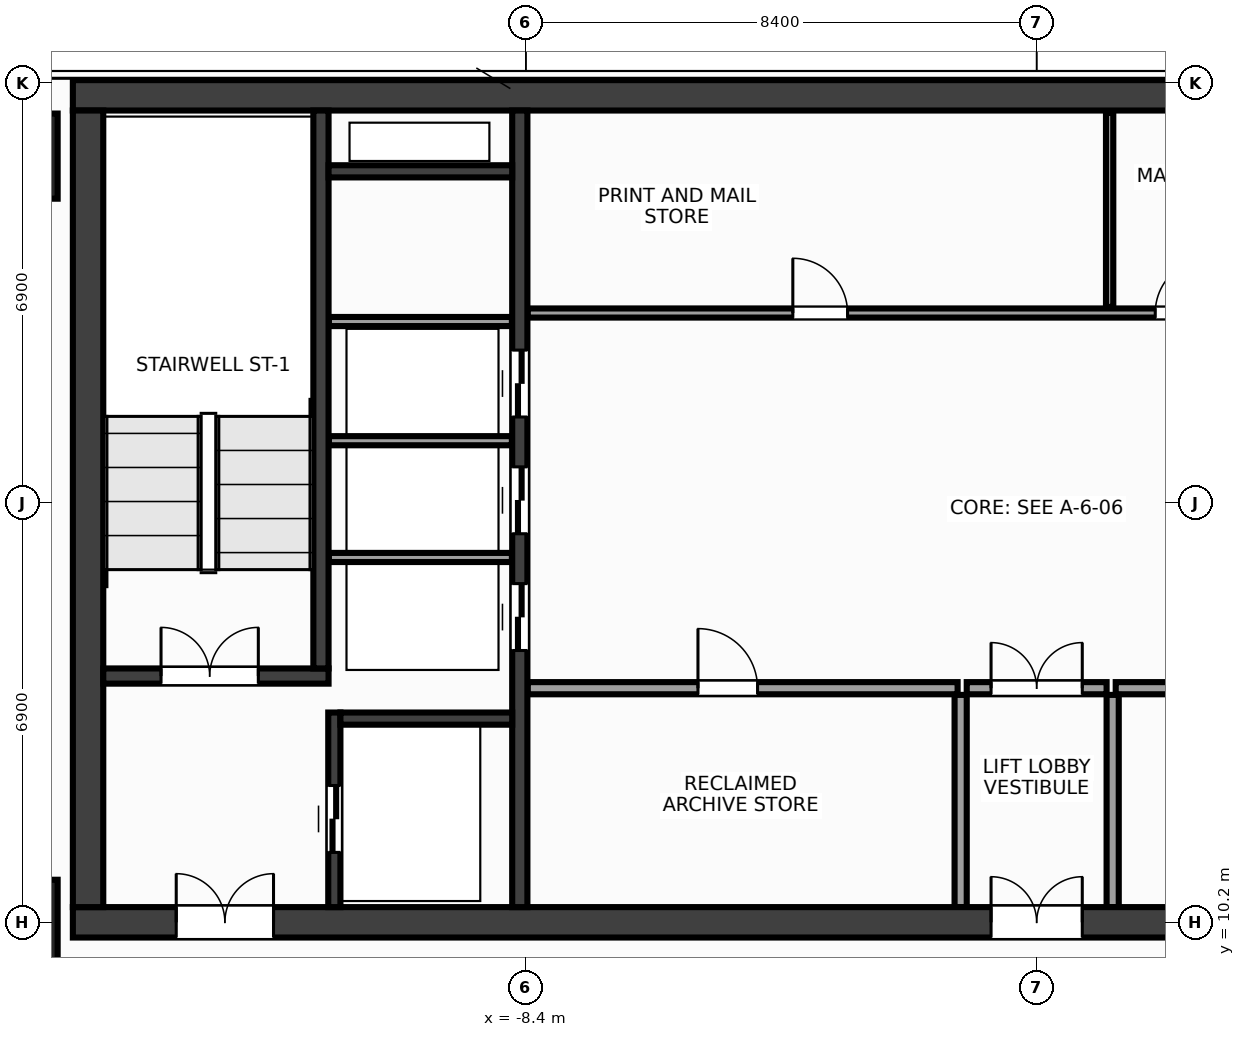
"""IFC4 building model, lengths in metres.
Left out: names, types, materials, properties, quantities, classifications, styles, units other than length and angle.
Written with IfcOpenShell. Run it as: python <this file> out.ifc"""

import sys

from ifc_helpers import new_model, si_unit, direction, frame, frame_2d, origin, origin_2d, place, context, subcontext, project, spatial, rectangle, extrude, source, transform, mapped, element, fill, save


model = new_model("IFC4")
c1 = context("Model", 3, precision=1e-05, world=origin(), true_north=direction((0.0, 1.0)))
c2 = subcontext(c1, "Body", "Model", "MODEL_VIEW")
j1 = project(units=[si_unit("LENGTHUNIT", "METRE"), si_unit("PLANEANGLEUNIT", "RADIAN")], contexts=[c1])
p1 = place(None, origin())
s1 = spatial("IfcSite", under=j1, at=p1, CompositionType="ELEMENT")
p2 = place(p1, origin())
s2 = spatial("IfcBuilding", under=s1, at=p2, CompositionType="ELEMENT")
p3 = place(p2, frame((0.0, 0.0, 250.4)))
s3 = spatial("IfcBuildingStorey", under=s2, at=p3, CompositionType="ELEMENT", Elevation=250.4)
m1 = source(origin(), c2, "Body", "SweptSolid", [
    extrude(rectangle(XDim=31.7, YDim=0.5, at=frame_2d((15.85, 0.0))), origin(), (0.0, 0.0, 1.0), 3.6),
])
p4 = place(p3, frame((-15.85, 23.8, 0.0), z_axis=(0.0, 0.0, 1.0), x_axis=(1.0, 0.0, 0.0)))
e1 = element("IfcWall", 1, at=p4, inside=s3, PredefinedType="SHEAR", context=c2, shape_type="MappedRepresentation", body=[
    mapped(m1, transform((0.0, 0.0, 0.0), x_axis=(1.0, 0.0, 0.0), y_axis=(0.0, 1.0, 0.0), z_axis=(0.0, 0.0, 1.0), scale=1.0)),
])
p5 = place(p3, frame((-15.85, 10.2, 0.0), z_axis=(0.0, 0.0, 1.0), x_axis=(1.0, 0.0, 0.0)))
e2 = element("IfcWall", 2, at=p5, inside=s3, PredefinedType="SHEAR", context=c2, shape_type="MappedRepresentation", body=[
    mapped(m1, transform((0.0, 0.0, 0.0), x_axis=(1.0, 0.0, 0.0), y_axis=(0.0, 1.0, 0.0), z_axis=(0.0, 0.0, 1.0), scale=1.0)),
])
p6 = place(p5, frame((1.7, 0.0, 0.0)))
e3 = element("IfcOpeningElement", 3, at=p6, cuts=e2, PredefinedType="OPENING", context=c2, shape_type="SweptSolid", body=[
    extrude(rectangle(XDim=1.6, YDim=2.15, at=frame_2d((0.8, 1.075))), frame((0.0, 0.262, 0.0), z_axis=(0.0, -1.0, 0.0), x_axis=(1.0, 0.0, 0.0)), (0.0, 0.0, 1.0), 0.524),
])
p7 = place(p5, frame((28.4, 0.0, 0.0)))
e4 = element("IfcOpeningElement", 4, at=p7, cuts=e2, PredefinedType="OPENING", context=c2, shape_type="SweptSolid", body=[
    extrude(rectangle(XDim=1.6, YDim=2.15, at=frame_2d((0.8, 1.075))), frame((0.0, 0.262, 0.0), z_axis=(0.0, -1.0, 0.0), x_axis=(1.0, 0.0, 0.0)), (0.0, 0.0, 1.0), 0.524),
])
p8 = place(p5, frame((15.1, 0.0, 0.0)))
e5 = element("IfcOpeningElement", 5, at=p8, cuts=e2, PredefinedType="OPENING", context=c2, shape_type="SweptSolid", body=[
    extrude(rectangle(XDim=1.5, YDim=2.2, at=frame_2d((0.75, 1.1))), frame((0.0, 0.262, 0.0), z_axis=(0.0, -1.0, 0.0), x_axis=(1.0, 0.0, 0.0)), (0.0, 0.0, 1.0), 0.524),
])
m2 = source(origin(), c2, "Body", "SweptSolid", [
    extrude(rectangle(XDim=13.1, YDim=0.5, at=frame_2d((6.55, 0.0))), origin(), (0.0, 0.0, 1.0), 3.6),
])
p9 = place(p3, frame((-15.6, 10.45, 0.0), z_axis=(0.0, 0.0, 1.0), x_axis=(0.0, 1.0, 0.0)))
e6 = element("IfcWall", 6, at=p9, inside=s3, PredefinedType="SHEAR", context=c2, shape_type="MappedRepresentation", body=[
    mapped(m2, transform((0.0, 0.0, 0.0), x_axis=(1.0, 0.0, 0.0), y_axis=(0.0, 1.0, 0.0), z_axis=(0.0, 0.0, 1.0), scale=1.0)),
])
m3 = source(origin(), c2, "Body", "SweptSolid", [
    extrude(rectangle(XDim=13.1, YDim=0.25, at=frame_2d((6.55, 0.0))), origin(), (0.0, 0.0, 1.0), 3.6),
])
p10 = place(p3, frame((-8.5, 10.45, 0.0), z_axis=(0.0, 0.0, 1.0), x_axis=(0.0, 1.0, 0.0)))
e7 = element("IfcWall", 7, at=p10, inside=s3, PredefinedType="SHEAR", context=c2, shape_type="MappedRepresentation", body=[
    mapped(m3, transform((0.0, 0.0, 0.0), x_axis=(1.0, 0.0, 0.0), y_axis=(0.0, 1.0, 0.0), z_axis=(0.0, 0.0, 1.0), scale=1.0)),
])
p11 = place(p10, frame((4.22, 0.0, 0.0)))
e8 = element("IfcOpeningElement", 8, at=p11, cuts=e7, PredefinedType="OPENING", context=c2, shape_type="SweptSolid", body=[
    extrude(rectangle(XDim=1.1, YDim=2.15, at=frame_2d((0.55, 1.075))), frame((0.0, 0.137, 0.0), z_axis=(0.0, -1.0, 0.0), x_axis=(1.0, 0.0, 0.0)), (0.0, 0.0, 1.0), 0.274),
])
p12 = place(p10, frame((6.14, 0.0, 0.0)))
e9 = element("IfcOpeningElement", 9, at=p12, cuts=e7, PredefinedType="OPENING", context=c2, shape_type="SweptSolid", body=[
    extrude(rectangle(XDim=1.1, YDim=2.15, at=frame_2d((0.55, 1.075))), frame((0.0, 0.137, 0.0), z_axis=(0.0, -1.0, 0.0), x_axis=(1.0, 0.0, 0.0)), (0.0, 0.0, 1.0), 0.274),
])
p13 = place(p10, frame((8.06, 0.0, 0.0)))
e10 = element("IfcOpeningElement", 10, at=p13, cuts=e7, PredefinedType="OPENING", context=c2, shape_type="SweptSolid", body=[
    extrude(rectangle(XDim=1.1, YDim=2.15, at=frame_2d((0.55, 1.075))), frame((0.0, 0.137, 0.0), z_axis=(0.0, -1.0, 0.0), x_axis=(1.0, 0.0, 0.0)), (0.0, 0.0, 1.0), 0.274),
])
m4 = source(origin(), c2, "Body", "SweptSolid", [
    extrude(rectangle(XDim=3.705, YDim=0.25, at=frame_2d((1.853, 0.0))), origin(), (0.0, 0.0, 1.0), 3.6),
])
p14 = place(p3, frame((-15.35, 14.25, 0.0), z_axis=(0.0, 0.0, 1.0), x_axis=(1.0, 0.0, 0.0)))
e11 = element("IfcWall", 11, at=p14, inside=s3, PredefinedType="SHEAR", context=c2, shape_type="MappedRepresentation", body=[
    mapped(m4, transform((0.0, 0.0, 0.0), x_axis=(1.0, 0.0, 0.0), y_axis=(0.0, 1.0, 0.0), z_axis=(0.0, 0.0, 1.0), scale=1.0)),
])
p15 = place(p14, frame((0.95, 0.0, 0.0)))
e12 = element("IfcOpeningElement", 12, at=p15, cuts=e11, PredefinedType="OPENING", context=c2, shape_type="SweptSolid", body=[
    extrude(rectangle(XDim=1.6, YDim=2.15, at=frame_2d((0.8, 1.075))), frame((0.0, 0.137, 0.0), z_axis=(0.0, -1.0, 0.0), x_axis=(1.0, 0.0, 0.0)), (0.0, 0.0, 1.0), 0.274),
])
m5 = source(origin(), c2, "Body", "SweptSolid", [
    extrude(rectangle(XDim=9.175, YDim=0.25, at=frame_2d((4.587, 0.0))), origin(), (0.0, 0.0, 1.0), 3.6),
])
p16 = place(p3, frame((-11.77, 14.375, 0.0), z_axis=(0.0, 0.0, 1.0), x_axis=(0.0, 1.0, 0.0)))
e13 = element("IfcWall", 13, at=p16, inside=s3, PredefinedType="SHEAR", context=c2, shape_type="MappedRepresentation", body=[
    mapped(m5, transform((0.0, 0.0, 0.0), x_axis=(1.0, 0.0, 0.0), y_axis=(0.0, 1.0, 0.0), z_axis=(0.0, 0.0, 1.0), scale=1.0)),
])
m6 = source(origin(), c2, "Body", "SweptSolid", [
    extrude(rectangle(XDim=3.2, YDim=0.2, at=frame_2d((1.6, 0.0))), origin(), (0.0, 0.0, 1.0), 3.6),
])
p17 = place(p3, frame((-11.55, 10.45, 0.0), z_axis=(0.0, 0.0, 1.0), x_axis=(0.0, 1.0, 0.0)))
e14 = element("IfcWall", 14, at=p17, inside=s3, PredefinedType="SHEAR", context=c2, shape_type="MappedRepresentation", body=[
    mapped(m6, transform((0.0, 0.0, 0.0), x_axis=(1.0, 0.0, 0.0), y_axis=(0.0, 1.0, 0.0), z_axis=(0.0, 0.0, 1.0), scale=1.0)),
])
p18 = place(p17, frame((0.9, 0.0, 0.0)))
e15 = element("IfcOpeningElement", 15, at=p18, cuts=e14, PredefinedType="OPENING", context=c2, shape_type="SweptSolid", body=[
    extrude(rectangle(XDim=1.1, YDim=2.15, at=frame_2d((0.55, 1.075))), frame((0.0, 0.112, 0.0), z_axis=(0.0, -1.0, 0.0), x_axis=(1.0, 0.0, 0.0)), (0.0, 0.0, 1.0), 0.224),
])
m7 = source(origin(), c2, "Body", "SweptSolid", [
    extrude(rectangle(XDim=2.825, YDim=0.2, at=frame_2d((1.413, 0.0))), origin(), (0.0, 0.0, 1.0), 3.6),
])
p19 = place(p3, frame((-11.45, 13.55, 0.0), z_axis=(0.0, 0.0, 1.0), x_axis=(1.0, 0.0, 0.0)))
e16 = element("IfcWall", 16, at=p19, inside=s3, PredefinedType="SHEAR", context=c2, shape_type="MappedRepresentation", body=[
    mapped(m7, transform((0.0, 0.0, 0.0), x_axis=(1.0, 0.0, 0.0), y_axis=(0.0, 1.0, 0.0), z_axis=(0.0, 0.0, 1.0), scale=1.0)),
])
m8 = source(origin(), c2, "Body", "SweptSolid", [
    extrude(rectangle(XDim=3.02, YDim=0.2, at=frame_2d((1.51, 0.0))), origin(), (0.0, 0.0, 1.0), 3.6),
])
p20 = place(p3, frame((-11.645, 22.55, 0.0), z_axis=(0.0, 0.0, 1.0), x_axis=(1.0, 0.0, 0.0)))
e17 = element("IfcWall", 17, at=p20, inside=s3, PredefinedType="SHEAR", context=c2, shape_type="MappedRepresentation", body=[
    mapped(m8, transform((0.0, 0.0, 0.0), x_axis=(1.0, 0.0, 0.0), y_axis=(0.0, 1.0, 0.0), z_axis=(0.0, 0.0, 1.0), scale=1.0)),
])
m9 = source(origin(), c2, "Body", "SweptSolid", [
    extrude(rectangle(XDim=1.4, YDim=1.4, at=origin_2d()), origin(), (0.0, 0.0, 1.0), 3.6),
])
for number, where, z_axis, x_axis in (
    (18, (-16.8, 10.2, 0.0), (0.0, 0.0, 1.0), (1.0, 0.0, 0.0)),
    (19, (-16.8, 22.8, 0.0), (0.0, 0.0, 1.0), (1.0, 0.0, 0.0)),
):
    element("IfcColumn", number, at=place(p3, frame(where, z_axis=z_axis, x_axis=x_axis)), inside=s3, PredefinedType="COLUMN", context=c2, shape_type="MappedRepresentation", body=[
        mapped(m9, transform((0.0, 0.0, 0.0), x_axis=(1.0, 0.0, 0.0), y_axis=(0.0, 1.0, 0.0), z_axis=(0.0, 0.0, 1.0), scale=1.0)),
    ])
m10 = source(origin(), c2, "Body", "SweptSolid", [
    extrude(rectangle(XDim=3.01, YDim=0.15, at=frame_2d((1.505, 0.0))), origin(), (0.0, 0.0, 1.0), 3.37),
])
for number, where, z_axis, x_axis in (
    (20, (-11.64, 16.2, 0.0), (0.0, 0.0, 1.0), (1.0, 0.0, 0.0)),
    (21, (-11.64, 18.12, 0.0), (0.0, 0.0, 1.0), (1.0, 0.0, 0.0)),
    (22, (-11.64, 20.08, 0.0), (0.0, 0.0, 1.0), (1.0, 0.0, 0.0)),
):
    element("IfcWall", number, at=place(p3, frame(where, z_axis=z_axis, x_axis=x_axis)), inside=s3, PredefinedType="PARTITIONING", context=c2, shape_type="MappedRepresentation", body=[
        mapped(m10, transform((0.0, 0.0, 0.0), x_axis=(1.0, 0.0, 0.0), y_axis=(0.0, 1.0, 0.0), z_axis=(0.0, 0.0, 1.0), scale=1.0)),
    ])
m11 = source(origin(), c2, "Body", "SweptSolid", [
    extrude(rectangle(XDim=7.07, YDim=0.2, at=frame_2d((3.535, 0.0))), origin(), (0.0, 0.0, 1.0), 3.37),
])
p21 = place(p3, frame((-8.37, 14.05, 0.0), z_axis=(0.0, 0.0, 1.0), x_axis=(1.0, 0.0, 0.0)))
e23 = element("IfcWall", 23, at=p21, inside=s3, PredefinedType="PARTITIONING", context=c2, shape_type="MappedRepresentation", body=[
    mapped(m11, transform((0.0, 0.0, 0.0), x_axis=(1.0, 0.0, 0.0), y_axis=(0.0, 1.0, 0.0), z_axis=(0.0, 0.0, 1.0), scale=1.0)),
])
p22 = place(p21, frame((2.8, 0.0, 0.0)))
e24 = element("IfcOpeningElement", 24, at=p22, cuts=e23, PredefinedType="OPENING", context=c2, shape_type="SweptSolid", body=[
    extrude(rectangle(XDim=0.98, YDim=2.15, at=frame_2d((0.49, 1.075))), frame((0.0, 0.112, 0.0), z_axis=(0.0, -1.0, 0.0), x_axis=(1.0, 0.0, 0.0)), (0.0, 0.0, 1.0), 0.224),
])
p23 = place(p3, frame((1.3, 14.05, 0.0), z_axis=(0.0, 0.0, 1.0), x_axis=(1.0, 0.0, 0.0)))
e25 = element("IfcWall", 25, at=p23, inside=s3, PredefinedType="PARTITIONING", context=c2, shape_type="MappedRepresentation", body=[
    mapped(m11, transform((0.0, 0.0, 0.0), x_axis=(1.0, 0.0, 0.0), y_axis=(0.0, 1.0, 0.0), z_axis=(0.0, 0.0, 1.0), scale=1.0)),
])
p24 = place(p23, frame((1.16, 0.0, 0.0)))
e26 = element("IfcOpeningElement", 26, at=p24, cuts=e25, PredefinedType="OPENING", context=c2, shape_type="SweptSolid", body=[
    extrude(rectangle(XDim=0.9, YDim=2.15, at=frame_2d((0.45, 1.075))), frame((0.0, 0.112, 0.0), z_axis=(0.0, -1.0, 0.0), x_axis=(1.0, 0.0, 0.0)), (0.0, 0.0, 1.0), 0.224),
])
p25 = place(p23, frame((4.61, 0.0, 0.0)))
e27 = element("IfcOpeningElement", 27, at=p25, cuts=e25, PredefinedType="OPENING", context=c2, shape_type="SweptSolid", body=[
    extrude(rectangle(XDim=0.9, YDim=2.15, at=frame_2d((0.45, 1.075))), frame((0.0, 0.112, 0.0), z_axis=(0.0, -1.0, 0.0), x_axis=(1.0, 0.0, 0.0)), (0.0, 0.0, 1.0), 0.224),
])
m12 = source(origin(), c2, "Body", "SweptSolid", [
    extrude(rectangle(XDim=3.49, YDim=0.2, at=frame_2d((1.745, 0.0))), origin(), (0.0, 0.0, 1.0), 3.37),
])
for number, where, z_axis, x_axis in (
    (28, (-1.25, 10.45, 0.0), (0.0, 0.0, 1.0), (0.0, 1.0, 0.0)),
    (29, (1.25, 10.45, 0.0), (0.0, 0.0, 1.0), (0.0, 1.0, 0.0)),
):
    element("IfcWall", number, at=place(p3, frame(where, z_axis=z_axis, x_axis=x_axis)), inside=s3, PredefinedType="PARTITIONING", context=c2, shape_type="MappedRepresentation", body=[
        mapped(m12, transform((0.0, 0.0, 0.0), x_axis=(1.0, 0.0, 0.0), y_axis=(0.0, 1.0, 0.0), z_axis=(0.0, 0.0, 1.0), scale=1.0)),
    ])
m13 = source(origin(), c2, "Body", "SweptSolid", [
    extrude(rectangle(XDim=2.3, YDim=0.2, at=frame_2d((1.15, 0.0))), origin(), (0.0, 0.0, 1.0), 3.37),
])
p26 = place(p3, frame((-1.15, 14.05, 0.0), z_axis=(0.0, 0.0, 1.0), x_axis=(1.0, 0.0, 0.0)))
e30 = element("IfcWall", 30, at=p26, inside=s3, PredefinedType="PARTITIONING", context=c2, shape_type="MappedRepresentation", body=[
    mapped(m13, transform((0.0, 0.0, 0.0), x_axis=(1.0, 0.0, 0.0), y_axis=(0.0, 1.0, 0.0), z_axis=(0.0, 0.0, 1.0), scale=1.0)),
])
p27 = place(p26, frame((0.4, 0.0, 0.0)))
e31 = element("IfcOpeningElement", 31, at=p27, cuts=e30, PredefinedType="OPENING", context=c2, shape_type="SweptSolid", body=[
    extrude(rectangle(XDim=1.5, YDim=2.2, at=frame_2d((0.75, 1.1))), frame((0.0, 0.112, 0.0), z_axis=(0.0, -1.0, 0.0), x_axis=(1.0, 0.0, 0.0)), (0.0, 0.0, 1.0), 0.224),
])
m14 = source(origin(), c2, "Body", "SweptSolid", [
    extrude(rectangle(XDim=14.59, YDim=0.15, at=frame_2d((7.295, 0.0))), origin(), (0.0, 0.0, 1.0), 3.37),
])
p28 = place(p3, frame((-8.37, 20.22, 0.0), z_axis=(0.0, 0.0, 1.0), x_axis=(1.0, 0.0, 0.0)))
e32 = element("IfcWall", 32, at=p28, inside=s3, PredefinedType="PARTITIONING", context=c2, shape_type="MappedRepresentation", body=[
    mapped(m14, transform((0.0, 0.0, 0.0), x_axis=(1.0, 0.0, 0.0), y_axis=(0.0, 1.0, 0.0), z_axis=(0.0, 0.0, 1.0), scale=1.0)),
])
p29 = place(p28, frame((4.36, 0.0, 0.0)))
e33 = element("IfcOpeningElement", 33, at=p29, cuts=e32, PredefinedType="OPENING", context=c2, shape_type="SweptSolid", body=[
    extrude(rectangle(XDim=0.9, YDim=2.15, at=frame_2d((0.45, 1.075))), frame((0.0, 0.087, 0.0), z_axis=(0.0, -1.0, 0.0), x_axis=(1.0, 0.0, 0.0)), (0.0, 0.0, 1.0), 0.174),
])
p30 = place(p28, frame((10.32, 0.0, 0.0)))
e34 = element("IfcOpeningElement", 34, at=p30, cuts=e32, PredefinedType="OPENING", context=c2, shape_type="SweptSolid", body=[
    extrude(rectangle(XDim=0.9, YDim=2.15, at=frame_2d((0.45, 1.075))), frame((0.0, 0.087, 0.0), z_axis=(0.0, -1.0, 0.0), x_axis=(1.0, 0.0, 0.0)), (0.0, 0.0, 1.0), 0.174),
])
p31 = place(p28, frame((12.77, 0.0, 0.0)))
e35 = element("IfcOpeningElement", 35, at=p31, cuts=e32, PredefinedType="OPENING", context=c2, shape_type="SweptSolid", body=[
    extrude(rectangle(XDim=0.9, YDim=2.15, at=frame_2d((0.45, 1.075))), frame((0.0, 0.087, 0.0), z_axis=(0.0, -1.0, 0.0), x_axis=(1.0, 0.0, 0.0)), (0.0, 0.0, 1.0), 0.174),
])
m15 = source(origin(), c2, "Body", "SweptSolid", [
    extrude(rectangle(XDim=3.19, YDim=0.12, at=frame_2d((1.595, 0.0))), origin(), (0.0, 0.0, 1.0), 3.37),
])
p32 = place(p3, frame((1.2, 20.32, 0.0), z_axis=(0.0, 0.0, 1.0), x_axis=(0.0, 1.0, 0.0)))
e36 = element("IfcWall", 36, at=p32, inside=s3, PredefinedType="PARTITIONING", context=c2, shape_type="MappedRepresentation", body=[
    mapped(m15, transform((0.0, 0.0, 0.0), x_axis=(1.0, 0.0, 0.0), y_axis=(0.0, 1.0, 0.0), z_axis=(0.0, 0.0, 1.0), scale=1.0)),
])
m16 = source(origin(), c2, "Body", "SweptSolid", [
    extrude(rectangle(XDim=1.6, YDim=2.15, at=frame_2d((0.8, 1.075))), frame((0.0, 0.025, 0.0), z_axis=(0.0, -1.0, 0.0), x_axis=(1.0, 0.0, 0.0)), (0.0, 0.0, 1.0), 0.05),
])
p33 = place(p15, origin())
e37 = element("IfcDoor", 37, at=p33, inside=s3, OperationType="DOUBLE_DOOR_SINGLE_SWING", PredefinedType="DOOR", context=c2, shape_type="MappedRepresentation", body=[
    mapped(m16, transform((0.0, 0.0, 0.0), x_axis=(1.0, 0.0, 0.0), y_axis=(0.0, 1.0, 0.0), z_axis=(0.0, 0.0, 1.0), scale=1.0)),
])
fill(e12, e37)
p34 = place(p6, origin())
e38 = element("IfcDoor", 38, at=p34, inside=s3, OperationType="DOUBLE_DOOR_SINGLE_SWING", PredefinedType="DOOR", context=c2, shape_type="MappedRepresentation", body=[
    mapped(m16, transform((0.0, 0.0, 0.0), x_axis=(1.0, 0.0, 0.0), y_axis=(0.0, 1.0, 0.0), z_axis=(0.0, 0.0, 1.0), scale=1.0)),
])
fill(e3, e38)
m17 = source(origin(), c2, "Body", "SweptSolid", [
    extrude(rectangle(XDim=1.1, YDim=2.15, at=frame_2d((0.55, 1.075))), frame((0.0, 0.025, 0.0), z_axis=(0.0, -1.0, 0.0), x_axis=(1.0, 0.0, 0.0)), (0.0, 0.0, 1.0), 0.05),
])
p35 = place(p18, origin())
e39 = element("IfcDoor", 39, at=p35, inside=s3, OperationType="DOUBLE_DOOR_SLIDING", PredefinedType="DOOR", context=c2, shape_type="MappedRepresentation", body=[
    mapped(m17, transform((0.0, 0.0, 0.0), x_axis=(1.0, 0.0, 0.0), y_axis=(0.0, 1.0, 0.0), z_axis=(0.0, 0.0, 1.0), scale=1.0)),
])
fill(e15, e39)
p36 = place(p11, origin())
e40 = element("IfcDoor", 40, at=p36, inside=s3, OperationType="DOUBLE_DOOR_SLIDING", PredefinedType="DOOR", context=c2, shape_type="MappedRepresentation", body=[
    mapped(m17, transform((0.0, 0.0, 0.0), x_axis=(1.0, 0.0, 0.0), y_axis=(0.0, 1.0, 0.0), z_axis=(0.0, 0.0, 1.0), scale=1.0)),
])
fill(e8, e40)
p37 = place(p12, origin())
e41 = element("IfcDoor", 41, at=p37, inside=s3, OperationType="DOUBLE_DOOR_SLIDING", PredefinedType="DOOR", context=c2, shape_type="MappedRepresentation", body=[
    mapped(m17, transform((0.0, 0.0, 0.0), x_axis=(1.0, 0.0, 0.0), y_axis=(0.0, 1.0, 0.0), z_axis=(0.0, 0.0, 1.0), scale=1.0)),
])
fill(e9, e41)
p38 = place(p13, origin())
e42 = element("IfcDoor", 42, at=p38, inside=s3, OperationType="DOUBLE_DOOR_SLIDING", PredefinedType="DOOR", context=c2, shape_type="MappedRepresentation", body=[
    mapped(m17, transform((0.0, 0.0, 0.0), x_axis=(1.0, 0.0, 0.0), y_axis=(0.0, 1.0, 0.0), z_axis=(0.0, 0.0, 1.0), scale=1.0)),
])
fill(e10, e42)
m18 = source(origin(), c2, "Body", "SweptSolid", [
    extrude(rectangle(XDim=0.98, YDim=2.15, at=frame_2d((0.49, 1.075))), frame((0.0, 0.025, 0.0), z_axis=(0.0, -1.0, 0.0), x_axis=(1.0, 0.0, 0.0)), (0.0, 0.0, 1.0), 0.05),
])
p39 = place(p22, origin())
e43 = element("IfcDoor", 43, at=p39, inside=s3, OperationType="SINGLE_SWING_LEFT", PredefinedType="DOOR", context=c2, shape_type="MappedRepresentation", body=[
    mapped(m18, transform((0.0, 0.0, 0.0), x_axis=(1.0, 0.0, 0.0), y_axis=(0.0, 1.0, 0.0), z_axis=(0.0, 0.0, 1.0), scale=1.0)),
])
fill(e24, e43)
m19 = source(origin(), c2, "Body", "SweptSolid", [
    extrude(rectangle(XDim=1.5, YDim=2.2, at=frame_2d((0.75, 1.1))), frame((0.0, 0.025, 0.0), z_axis=(0.0, -1.0, 0.0), x_axis=(1.0, 0.0, 0.0)), (0.0, 0.0, 1.0), 0.05),
])
p40 = place(p27, origin())
e44 = element("IfcDoor", 44, at=p40, inside=s3, OperationType="DOUBLE_DOOR_SINGLE_SWING", PredefinedType="DOOR", context=c2, shape_type="MappedRepresentation", body=[
    mapped(m19, transform((0.0, 0.0, 0.0), x_axis=(1.0, 0.0, 0.0), y_axis=(0.0, 1.0, 0.0), z_axis=(0.0, 0.0, 1.0), scale=1.0)),
])
fill(e31, e44)
p41 = place(p8, origin())
e45 = element("IfcDoor", 45, at=p41, inside=s3, OperationType="DOUBLE_DOOR_SINGLE_SWING", PredefinedType="DOOR", context=c2, shape_type="MappedRepresentation", body=[
    mapped(m19, transform((0.0, 0.0, 0.0), x_axis=(1.0, 0.0, 0.0), y_axis=(0.0, 1.0, 0.0), z_axis=(0.0, 0.0, 1.0), scale=1.0)),
])
fill(e5, e45)
m20 = source(origin(), c2, "Body", "SweptSolid", [
    extrude(rectangle(XDim=0.9, YDim=2.15, at=frame_2d((0.45, 1.075))), frame((0.0, 0.025, 0.0), z_axis=(0.0, -1.0, 0.0), x_axis=(1.0, 0.0, 0.0)), (0.0, 0.0, 1.0), 0.05),
])
p42 = place(p29, origin())
e46 = element("IfcDoor", 46, at=p42, inside=s3, OperationType="SINGLE_SWING_LEFT", PredefinedType="DOOR", context=c2, shape_type="MappedRepresentation", body=[
    mapped(m20, transform((0.0, 0.0, 0.0), x_axis=(1.0, 0.0, 0.0), y_axis=(0.0, 1.0, 0.0), z_axis=(0.0, 0.0, 1.0), scale=1.0)),
])
fill(e33, e46)
p43 = place(p30, origin())
e47 = element("IfcDoor", 47, at=p43, inside=s3, OperationType="SINGLE_SWING_RIGHT", PredefinedType="DOOR", context=c2, shape_type="MappedRepresentation", body=[
    mapped(m20, transform((0.0, 0.0, 0.0), x_axis=(1.0, 0.0, 0.0), y_axis=(0.0, 1.0, 0.0), z_axis=(0.0, 0.0, 1.0), scale=1.0)),
])
fill(e34, e47)
save(model, sys.argv[1])
